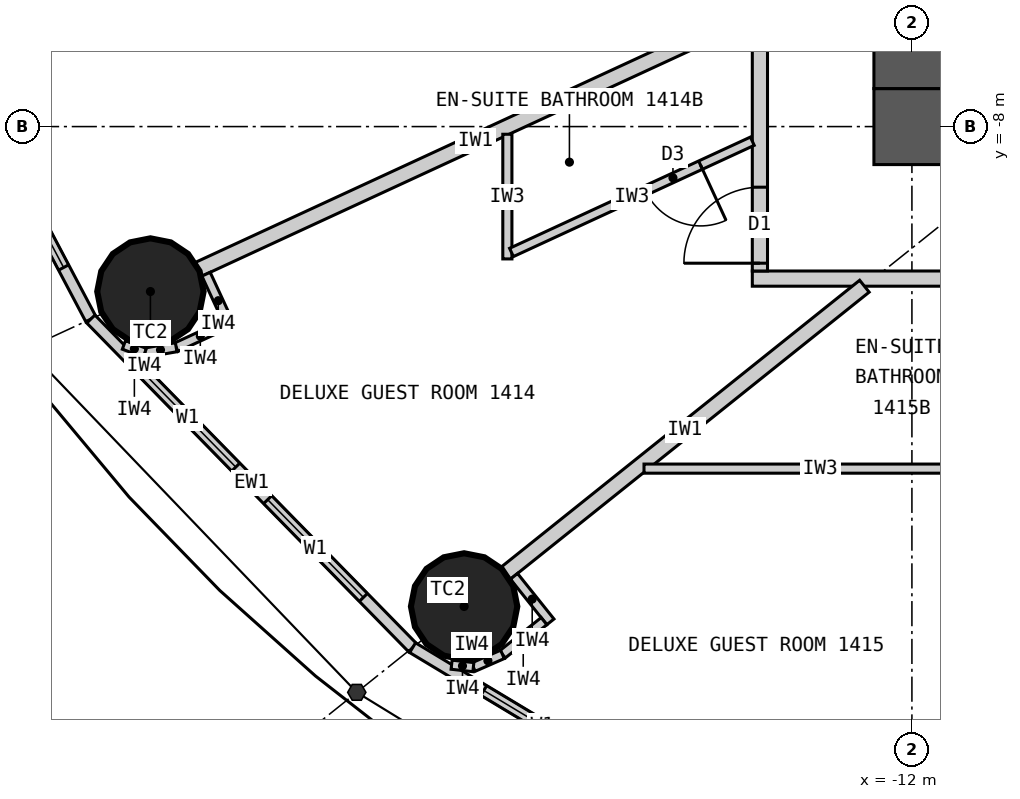
"""IFC4 building model, lengths in metres.
Left out: names, types, materials, properties, quantities, classifications, styles, units other than length and angle.
Written with IfcOpenShell. Run it as: python <this file> out.ifc"""

import sys

from ifc_helpers import new_model, si_unit, direction, frame, frame_2d, origin, origin_2d, place, context, subcontext, project, spatial, rectangle, circle, extrude, element, fill, save


model = new_model("IFC4")
c1 = context("Model", 3, precision=1e-05, world=origin(), true_north=direction((0.0, 1.0)))
c2 = subcontext(c1, "Body", "Model", "MODEL_VIEW")
j1 = project(units=[si_unit("LENGTHUNIT", "METRE"), si_unit("PLANEANGLEUNIT", "RADIAN")], contexts=[c1])
p1 = place(None, origin())
s1 = spatial("IfcSite", under=j1, at=p1, CompositionType="ELEMENT")
p2 = place(p1, origin())
s2 = spatial("IfcBuilding", under=s1, at=p2, CompositionType="ELEMENT")
p3 = place(p2, frame((0.0, 0.0, 60.6)))
s3 = spatial("IfcBuildingStorey", under=s2, at=p3, CompositionType="ELEMENT", Elevation=60.6)
for number, where, z_axis, x_axis in (
    (1, (-22.019, -10.17, 0.0), (0.0, 0.0, 1.0), (1.0, 0.0, 0.0)),
    (2, (-17.892, -14.313, 0.0), (0.0, 0.0, 1.0), (1.0, 0.0, 0.0)),
):
    element("IfcColumn", number, at=place(p3, frame(where, z_axis=z_axis, x_axis=x_axis)), inside=s3, PredefinedType="COLUMN", context=c2, shape_type="SweptSolid", body=[
        extrude(circle(Radius=0.7, at=origin_2d()), origin(), (0.0, 0.0, 1.0), 3.3),
    ])
p4 = place(p3, frame((12.5, -8.0, 0.0), z_axis=(0.0, 0.0, 1.0), x_axis=(-1.0, 0.0, 0.0)))
e3 = element("IfcWall", 3, at=p4, inside=s3, PredefinedType="SHEAR", context=c2, shape_type="SweptSolid", body=[
    extrude(rectangle(XDim=25.0, YDim=1.0, at=frame_2d((12.5, 0.0))), origin(), (0.0, 0.0, 1.0), 3.3),
])
p5 = place(p4, frame((11.2, 0.0, 0.0)))
e4 = element("IfcOpeningElement", 4, at=p5, cuts=e3, PredefinedType="OPENING", context=c2, shape_type="SweptSolid", body=[
    extrude(rectangle(XDim=1.2, YDim=2.2, at=frame_2d((0.6, 1.1))), frame((0.0, 0.51, 0.0), z_axis=(0.0, -1.0, 0.0), x_axis=(1.0, 0.0, 0.0)), (0.0, 0.0, 1.0), 1.02),
])
p6 = place(p4, frame((18.8, 0.0, 0.0)))
e5 = element("IfcOpeningElement", 5, at=p6, cuts=e3, PredefinedType="OPENING", context=c2, shape_type="SweptSolid", body=[
    extrude(rectangle(XDim=0.9, YDim=2.2, at=frame_2d((0.45, 1.1))), frame((0.0, 0.51, 0.0), z_axis=(0.0, -1.0, 0.0), x_axis=(1.0, 0.0, 0.0)), (0.0, 0.0, 1.0), 1.02),
])
p7 = place(p3, frame((-12.0, 7.5, 0.0), z_axis=(0.0, 0.0, 1.0), x_axis=(0.0, -1.0, 0.0)))
e6 = element("IfcWall", 6, at=p7, inside=s3, PredefinedType="SHEAR", context=c2, shape_type="SweptSolid", body=[
    extrude(rectangle(XDim=15.0, YDim=1.0, at=frame_2d((7.5, 0.0))), origin(), (0.0, 0.0, 1.0), 3.3),
])
p8 = place(p7, frame((6.6, 0.0, 0.0)))
e7 = element("IfcOpeningElement", 7, at=p8, cuts=e6, PredefinedType="OPENING", context=c2, shape_type="SweptSolid", body=[
    extrude(rectangle(XDim=1.8, YDim=2.2, at=frame_2d((0.9, 1.1))), frame((0.0, 0.51, 0.0), z_axis=(0.0, -1.0, 0.0), x_axis=(1.0, 0.0, 0.0)), (0.0, 0.0, 1.0), 1.02),
])
p9 = place(p3, frame((-25.482, -5.462, 0.0), z_axis=(0.0, 0.0, 1.0), x_axis=(0.467296867008, -0.884100468321, 0.0)))
e8 = element("IfcWall", 8, at=p9, inside=s3, PredefinedType="ELEMENTEDWALL", context=c2, shape_type="SweptSolid", body=[
    extrude(rectangle(XDim=5.734, YDim=0.15, at=frame_2d((2.867, 0.0))), origin(), (0.0, 0.0, 1.0), 3.12),
])
p10 = place(p9, frame((0.767, 0.0, 0.9)))
e9 = element("IfcOpeningElement", 9, at=p10, cuts=e8, PredefinedType="OPENING", context=c2, shape_type="SweptSolid", body=[
    extrude(rectangle(XDim=1.8, YDim=1.9, at=frame_2d((0.9, 0.95))), frame((0.0, 0.085, 0.0), z_axis=(0.0, -1.0, 0.0), x_axis=(1.0, 0.0, 0.0)), (0.0, 0.0, 1.0), 0.17),
])
p11 = place(p9, frame((3.167, 0.0, 0.9)))
e10 = element("IfcOpeningElement", 10, at=p11, cuts=e8, PredefinedType="OPENING", context=c2, shape_type="SweptSolid", body=[
    extrude(rectangle(XDim=1.8, YDim=1.9, at=frame_2d((0.9, 0.95))), frame((0.0, 0.085, 0.0), z_axis=(0.0, -1.0, 0.0), x_axis=(1.0, 0.0, 0.0)), (0.0, 0.0, 1.0), 0.17),
])
p12 = place(p3, frame((-22.803, -10.532, 0.0), z_axis=(0.0, 0.0, 1.0), x_axis=(0.699602905915, -0.714531856557, 0.0)))
e11 = element("IfcWall", 11, at=p12, inside=s3, PredefinedType="ELEMENTEDWALL", context=c2, shape_type="SweptSolid", body=[
    extrude(rectangle(XDim=6.051, YDim=0.15, at=frame_2d((3.025, 0.0))), origin(), (0.0, 0.0, 1.0), 3.12),
])
p13 = place(p12, frame((0.926, 0.0, 0.9)))
e12 = element("IfcOpeningElement", 12, at=p13, cuts=e11, PredefinedType="OPENING", context=c2, shape_type="SweptSolid", body=[
    extrude(rectangle(XDim=1.8, YDim=1.9, at=frame_2d((0.9, 0.95))), frame((0.0, 0.085, 0.0), z_axis=(0.0, -1.0, 0.0), x_axis=(1.0, 0.0, 0.0)), (0.0, 0.0, 1.0), 0.17),
])
p14 = place(p12, frame((3.325, 0.0, 0.9)))
e13 = element("IfcOpeningElement", 13, at=p14, cuts=e11, PredefinedType="OPENING", context=c2, shape_type="SweptSolid", body=[
    extrude(rectangle(XDim=1.8, YDim=1.9, at=frame_2d((0.9, 0.95))), frame((0.0, 0.085, 0.0), z_axis=(0.0, -1.0, 0.0), x_axis=(1.0, 0.0, 0.0)), (0.0, 0.0, 1.0), 0.17),
])
p15 = place(p3, frame((-18.57, -14.856, 0.0), z_axis=(0.0, 0.0, 1.0), x_axis=(0.856983180864, -0.515344377787, 0.0)))
e14 = element("IfcWall", 14, at=p15, inside=s3, PredefinedType="ELEMENTEDWALL", context=c2, shape_type="SweptSolid", body=[
    extrude(rectangle(XDim=6.386, YDim=0.15, at=frame_2d((3.193, 0.0))), origin(), (0.0, 0.0, 1.0), 3.12),
])
p16 = place(p15, frame((1.093, 0.0, 0.9)))
e15 = element("IfcOpeningElement", 15, at=p16, cuts=e14, PredefinedType="OPENING", context=c2, shape_type="SweptSolid", body=[
    extrude(rectangle(XDim=1.8, YDim=1.9, at=frame_2d((0.9, 0.95))), frame((0.0, 0.085, 0.0), z_axis=(0.0, -1.0, 0.0), x_axis=(1.0, 0.0, 0.0)), (0.0, 0.0, 1.0), 0.17),
])
p17 = place(p15, frame((3.493, 0.0, 0.9)))
e16 = element("IfcOpeningElement", 16, at=p17, cuts=e14, PredefinedType="OPENING", context=c2, shape_type="SweptSolid", body=[
    extrude(rectangle(XDim=1.8, YDim=1.9, at=frame_2d((0.9, 0.95))), frame((0.0, 0.085, 0.0), z_axis=(0.0, -1.0, 0.0), x_axis=(1.0, 0.0, 0.0)), (0.0, 0.0, 1.0), 0.17),
])
p18 = place(p3, frame((14.1, -10.0, 0.0), z_axis=(0.0, 0.0, 1.0), x_axis=(-1.0, 0.0, 0.0)))
e17 = element("IfcWall", 17, at=p18, inside=s3, PredefinedType="PARTITIONING", context=c2, shape_type="SweptSolid", body=[
    extrude(rectangle(XDim=28.2, YDim=0.2, at=frame_2d((14.1, 0.0))), origin(), (0.0, 0.0, 1.0), 3.12),
])
p19 = place(p18, frame((23.865, 0.0, 0.0)))
e18 = element("IfcOpeningElement", 18, at=p19, cuts=e17, PredefinedType="OPENING", context=c2, shape_type="SweptSolid", body=[
    extrude(rectangle(XDim=1.0, YDim=2.2, at=frame_2d((0.5, 1.1))), frame((0.0, 0.11, 0.0), z_axis=(0.0, -1.0, 0.0), x_axis=(1.0, 0.0, 0.0)), (0.0, 0.0, 1.0), 0.22),
])
p20 = place(p18, frame((18.529, 0.0, 0.0)))
e19 = element("IfcOpeningElement", 19, at=p20, cuts=e17, PredefinedType="OPENING", context=c2, shape_type="SweptSolid", body=[
    extrude(rectangle(XDim=1.0, YDim=2.2, at=frame_2d((0.5, 1.1))), frame((0.0, 0.11, 0.0), z_axis=(0.0, -1.0, 0.0), x_axis=(1.0, 0.0, 0.0)), (0.0, 0.0, 1.0), 0.22),
])
p21 = place(p18, frame((14.623, 0.0, 0.0)))
e20 = element("IfcOpeningElement", 20, at=p21, cuts=e17, PredefinedType="OPENING", context=c2, shape_type="SweptSolid", body=[
    extrude(rectangle(XDim=1.0, YDim=2.2, at=frame_2d((0.5, 1.1))), frame((0.0, 0.11, 0.0), z_axis=(0.0, -1.0, 0.0), x_axis=(1.0, 0.0, 0.0)), (0.0, 0.0, 1.0), 0.22),
])
p22 = place(p18, frame((11.24, 0.0, 0.0)))
e21 = element("IfcOpeningElement", 21, at=p22, cuts=e17, PredefinedType="OPENING", context=c2, shape_type="SweptSolid", body=[
    extrude(rectangle(XDim=1.0, YDim=2.2, at=frame_2d((0.5, 1.1))), frame((0.0, 0.11, 0.0), z_axis=(0.0, -1.0, 0.0), x_axis=(1.0, 0.0, 0.0)), (0.0, 0.0, 1.0), 0.22),
])
p23 = place(p18, frame((8.671, 0.0, 0.0)))
e22 = element("IfcOpeningElement", 22, at=p23, cuts=e17, PredefinedType="OPENING", context=c2, shape_type="SweptSolid", body=[
    extrude(rectangle(XDim=1.0, YDim=2.2, at=frame_2d((0.5, 1.1))), frame((0.0, 0.11, 0.0), z_axis=(0.0, -1.0, 0.0), x_axis=(1.0, 0.0, 0.0)), (0.0, 0.0, 1.0), 0.22),
])
p24 = place(p18, frame((2.801, 0.0, 0.0)))
e23 = element("IfcOpeningElement", 23, at=p24, cuts=e17, PredefinedType="OPENING", context=c2, shape_type="SweptSolid", body=[
    extrude(rectangle(XDim=1.0, YDim=2.2, at=frame_2d((0.5, 1.1))), frame((0.0, 0.11, 0.0), z_axis=(0.0, -1.0, 0.0), x_axis=(1.0, 0.0, 0.0)), (0.0, 0.0, 1.0), 0.22),
])
p25 = place(p3, frame((-14.0, 9.9, 0.0), z_axis=(0.0, 0.0, 1.0), x_axis=(0.0, -1.0, 0.0)))
e24 = element("IfcWall", 24, at=p25, inside=s3, PredefinedType="PARTITIONING", context=c2, shape_type="SweptSolid", body=[
    extrude(rectangle(XDim=19.8, YDim=0.2, at=frame_2d((9.9, 0.0))), origin(), (0.0, 0.0, 1.0), 3.12),
])
p26 = place(p25, frame((0.103, 0.0, 0.0)))
e25 = element("IfcOpeningElement", 25, at=p26, cuts=e24, PredefinedType="OPENING", context=c2, shape_type="SweptSolid", body=[
    extrude(rectangle(XDim=1.0, YDim=2.2, at=frame_2d((0.5, 1.1))), frame((0.0, 0.11, 0.0), z_axis=(0.0, -1.0, 0.0), x_axis=(1.0, 0.0, 0.0)), (0.0, 0.0, 1.0), 0.22),
])
p27 = place(p25, frame((5.248, 0.0, 0.0)))
e26 = element("IfcOpeningElement", 26, at=p27, cuts=e24, PredefinedType="OPENING", context=c2, shape_type="SweptSolid", body=[
    extrude(rectangle(XDim=1.0, YDim=2.2, at=frame_2d((0.5, 1.1))), frame((0.0, 0.11, 0.0), z_axis=(0.0, -1.0, 0.0), x_axis=(1.0, 0.0, 0.0)), (0.0, 0.0, 1.0), 0.22),
])
p28 = place(p25, frame((9.438, 0.0, 0.0)))
e27 = element("IfcOpeningElement", 27, at=p28, cuts=e24, PredefinedType="OPENING", context=c2, shape_type="SweptSolid", body=[
    extrude(rectangle(XDim=1.0, YDim=2.2, at=frame_2d((0.5, 1.1))), frame((0.0, 0.11, 0.0), z_axis=(0.0, -1.0, 0.0), x_axis=(1.0, 0.0, 0.0)), (0.0, 0.0, 1.0), 0.22),
])
p29 = place(p25, frame((13.942, 0.0, 0.0)))
e28 = element("IfcOpeningElement", 28, at=p29, cuts=e24, PredefinedType="OPENING", context=c2, shape_type="SweptSolid", body=[
    extrude(rectangle(XDim=1.0, YDim=2.2, at=frame_2d((0.5, 1.1))), frame((0.0, 0.11, 0.0), z_axis=(0.0, -1.0, 0.0), x_axis=(1.0, 0.0, 0.0)), (0.0, 0.0, 1.0), 0.22),
])
p30 = place(p25, frame((18.698, 0.0, 0.0)))
e29 = element("IfcOpeningElement", 29, at=p30, cuts=e24, PredefinedType="OPENING", context=c2, shape_type="SweptSolid", body=[
    extrude(rectangle(XDim=1.0, YDim=2.2, at=frame_2d((0.5, 1.1))), frame((0.0, 0.11, 0.0), z_axis=(0.0, -1.0, 0.0), x_axis=(1.0, 0.0, 0.0)), (0.0, 0.0, 1.0), 0.22),
])
p31 = place(p3, frame((-14.1, -6.512, 0.0), z_axis=(0.0, 0.0, 1.0), x_axis=(-0.907832871056, -0.419332181247, 0.0)))
e30 = element("IfcWall", 30, at=p31, inside=s3, PredefinedType="PARTITIONING", context=c2, shape_type="SweptSolid", body=[
    extrude(rectangle(XDim=8.023, YDim=0.2, at=frame_2d((4.011, 0.0))), origin(), (0.0, 0.0, 1.0), 2.32),
])
p32 = place(p3, frame((-12.625, -10.1, 0.0), z_axis=(0.0, 0.0, 1.0), x_axis=(-0.780892451574, -0.624665493744, 0.0)))
e31 = element("IfcWall", 31, at=p32, inside=s3, PredefinedType="PARTITIONING", context=c2, shape_type="SweptSolid", body=[
    extrude(rectangle(XDim=6.045, YDim=0.2, at=frame_2d((3.022, 0.0))), origin(), (0.0, 0.0, 1.0), 2.32),
])
p33 = place(p3, frame((-7.289, -10.1, 0.0), z_axis=(0.0, 0.0, 1.0), x_axis=(-0.585198353053, -0.810890182197, 0.0)))
e32 = element("IfcWall", 32, at=p33, inside=s3, PredefinedType="PARTITIONING", context=c2, shape_type="SweptSolid", body=[
    extrude(rectangle(XDim=8.36, YDim=0.2, at=frame_2d((4.18, 0.0))), origin(), (0.0, 0.0, 1.0), 2.32),
])
p34 = place(p3, frame((-17.323, -8.101, 0.0), z_axis=(0.0, 0.0, 1.0), x_axis=(0.0, -1.0, 0.0)))
e33 = element("IfcWall", 33, at=p34, inside=s3, PredefinedType="PARTITIONING", context=c2, shape_type="SweptSolid", body=[
    extrude(rectangle(XDim=1.64, YDim=0.12, at=frame_2d((0.82, 0.0))), origin(), (0.0, 0.0, 1.0), 3.12),
])
p35 = place(p3, frame((-14.1, -8.193, 0.0), z_axis=(0.0, 0.0, 1.0), x_axis=(-0.907836493557, -0.419324338628, 0.0)))
e34 = element("IfcWall", 34, at=p35, inside=s3, PredefinedType="PARTITIONING", context=c2, shape_type="SweptSolid", body=[
    extrude(rectangle(XDim=3.49, YDim=0.12, at=frame_2d((1.745, 0.0))), origin(), (0.0, 0.0, 1.0), 3.12),
])
p36 = place(p35, frame((0.75, 0.0, 0.0)))
e35 = element("IfcOpeningElement", 35, at=p36, cuts=e34, PredefinedType="OPENING", context=c2, shape_type="SweptSolid", body=[
    extrude(rectangle(XDim=0.8, YDim=2.1, at=frame_2d((0.4, 1.05))), frame((0.0, 0.07, 0.0), z_axis=(0.0, -1.0, 0.0), x_axis=(1.0, 0.0, 0.0)), (0.0, 0.0, 1.0), 0.14),
])
p37 = place(p3, frame((-15.525, -12.5, 0.0), z_axis=(0.0, 0.0, 1.0), x_axis=(1.0, 0.0, 0.0)))
e36 = element("IfcWall", 36, at=p37, inside=s3, PredefinedType="PARTITIONING", context=c2, shape_type="SweptSolid", body=[
    extrude(rectangle(XDim=4.64, YDim=0.12, at=frame_2d((2.32, 0.0))), origin(), (0.0, 0.0, 1.0), 3.12),
])
p38 = place(p3, frame((-21.287, -9.942, 0.0), z_axis=(0.0, 0.0, 1.0), x_axis=(0.419259891039, -0.907866258744, 0.0)))
e37 = element("IfcWall", 37, at=p38, inside=s3, PredefinedType="PARTITIONING", context=c2, shape_type="SweptSolid", body=[
    extrude(rectangle(XDim=0.768, YDim=0.12, at=frame_2d((0.384, 0.0))), origin(), (0.0, 0.0, 1.0), 3.12),
])
p39 = place(p3, frame((-21.045, -10.61, 0.0), z_axis=(0.0, 0.0, 1.0), x_axis=(-0.907877701396, -0.419235112208, 0.0)))
e38 = element("IfcWall", 38, at=p39, inside=s3, PredefinedType="PARTITIONING", context=c2, shape_type="SweptSolid", body=[
    extrude(rectangle(XDim=0.7, YDim=0.12, at=frame_2d((0.35, 0.0))), origin(), (0.0, 0.0, 1.0), 3.12),
])
p40 = place(p3, frame((-21.68, -10.903, 0.0), z_axis=(0.0, 0.0, 1.0), x_axis=(-0.985446622073, -0.169985161247, 0.0)))
e39 = element("IfcWall", 39, at=p40, inside=s3, PredefinedType="PARTITIONING", context=c2, shape_type="SweptSolid", body=[
    extrude(rectangle(XDim=0.418, YDim=0.12, at=frame_2d((0.209, 0.0))), origin(), (0.0, 0.0, 1.0), 3.12),
])
p41 = place(p3, frame((-22.092, -10.974, 0.0), z_axis=(0.0, 0.0, 1.0), x_axis=(-0.938428160676, 0.345474437912, 0.0)))
e40 = element("IfcWall", 40, at=p41, inside=s3, PredefinedType="PARTITIONING", context=c2, shape_type="SweptSolid", body=[
    extrude(rectangle(XDim=0.294, YDim=0.12, at=frame_2d((0.147, 0.0))), origin(), (0.0, 0.0, 1.0), 3.12),
])
p42 = place(p3, frame((-17.236, -13.917, 0.0), z_axis=(0.0, 0.0, 1.0), x_axis=(0.624695047554, -0.780868809443, 0.0)))
e41 = element("IfcWall", 41, at=p42, inside=s3, PredefinedType="PARTITIONING", context=c2, shape_type="SweptSolid", body=[
    extrude(rectangle(XDim=0.768, YDim=0.12, at=frame_2d((0.384, 0.0))), origin(), (0.0, 0.0, 1.0), 3.12),
])
p43 = place(p3, frame((-16.841, -14.507, 0.0), z_axis=(0.0, 0.0, 1.0), x_axis=(-0.780902834923, -0.62465251333, 0.0)))
e42 = element("IfcWall", 42, at=p43, inside=s3, PredefinedType="PARTITIONING", context=c2, shape_type="SweptSolid", body=[
    extrude(rectangle(XDim=0.7, YDim=0.12, at=frame_2d((0.35, 0.0))), origin(), (0.0, 0.0, 1.0), 3.12),
])
p44 = place(p3, frame((-17.387, -14.944, 0.0), z_axis=(0.0, 0.0, 1.0), x_axis=(-0.916036698064, -0.401094462441, 0.0)))
e43 = element("IfcWall", 43, at=p44, inside=s3, PredefinedType="PARTITIONING", context=c2, shape_type="SweptSolid", body=[
    extrude(rectangle(XDim=0.418, YDim=0.12, at=frame_2d((0.209, 0.0))), origin(), (0.0, 0.0, 1.0), 3.12),
])
p45 = place(p3, frame((-17.77, -15.112, 0.0), z_axis=(0.0, 0.0, 1.0), x_axis=(-0.993904401174, 0.110245368731, 0.0)))
e44 = element("IfcWall", 44, at=p45, inside=s3, PredefinedType="PARTITIONING", context=c2, shape_type="SweptSolid", body=[
    extrude(rectangle(XDim=0.288, YDim=0.12, at=frame_2d((0.144, 0.0))), origin(), (0.0, 0.0, 1.0), 3.12),
])
p46 = place(p11, origin())
e45 = element("IfcWindow", 45, at=p46, inside=s3, PartitioningType="SINGLE_PANEL", PredefinedType="WINDOW", context=c2, shape_type="SweptSolid", body=[
    extrude(rectangle(XDim=1.8, YDim=1.9, at=frame_2d((0.9, 0.95))), frame((0.0, 0.03, 0.0), z_axis=(0.0, -1.0, 0.0), x_axis=(1.0, 0.0, 0.0)), (0.0, 0.0, 1.0), 0.06),
])
fill(e10, e45)
p47 = place(p13, origin())
e46 = element("IfcWindow", 46, at=p47, inside=s3, PartitioningType="SINGLE_PANEL", PredefinedType="WINDOW", context=c2, shape_type="SweptSolid", body=[
    extrude(rectangle(XDim=1.8, YDim=1.9, at=frame_2d((0.9, 0.95))), frame((0.0, 0.03, 0.0), z_axis=(0.0, -1.0, 0.0), x_axis=(1.0, 0.0, 0.0)), (0.0, 0.0, 1.0), 0.06),
])
fill(e12, e46)
p48 = place(p14, origin())
e47 = element("IfcWindow", 47, at=p48, inside=s3, PartitioningType="SINGLE_PANEL", PredefinedType="WINDOW", context=c2, shape_type="SweptSolid", body=[
    extrude(rectangle(XDim=1.8, YDim=1.9, at=frame_2d((0.9, 0.95))), frame((0.0, 0.03, 0.0), z_axis=(0.0, -1.0, 0.0), x_axis=(1.0, 0.0, 0.0)), (0.0, 0.0, 1.0), 0.06),
])
fill(e13, e47)
p49 = place(p16, origin())
e48 = element("IfcWindow", 48, at=p49, inside=s3, PartitioningType="SINGLE_PANEL", PredefinedType="WINDOW", context=c2, shape_type="SweptSolid", body=[
    extrude(rectangle(XDim=1.8, YDim=1.9, at=frame_2d((0.9, 0.95))), frame((0.0, 0.03, 0.0), z_axis=(0.0, -1.0, 0.0), x_axis=(1.0, 0.0, 0.0)), (0.0, 0.0, 1.0), 0.06),
])
fill(e15, e48)
p50 = place(p36, origin())
e49 = element("IfcDoor", 49, at=p50, inside=s3, OperationType="SINGLE_SWING_LEFT", PredefinedType="DOOR", context=c2, shape_type="SweptSolid", body=[
    extrude(rectangle(XDim=0.8, YDim=2.1, at=frame_2d((0.4, 1.05))), frame((0.0, 0.025, 0.0), z_axis=(0.0, -1.0, 0.0), x_axis=(1.0, 0.0, 0.0)), (0.0, 0.0, 1.0), 0.05),
])
fill(e35, e49)
p51 = place(p30, origin())
e50 = element("IfcDoor", 50, at=p51, inside=s3, OperationType="SINGLE_SWING_RIGHT", PredefinedType="DOOR", context=c2, shape_type="SweptSolid", body=[
    extrude(rectangle(XDim=1.0, YDim=2.2, at=frame_2d((0.5, 1.1))), frame((0.0, 0.025, 0.0), z_axis=(0.0, -1.0, 0.0), x_axis=(1.0, 0.0, 0.0)), (0.0, 0.0, 1.0), 0.05),
])
fill(e29, e50)
save(model, sys.argv[1])
